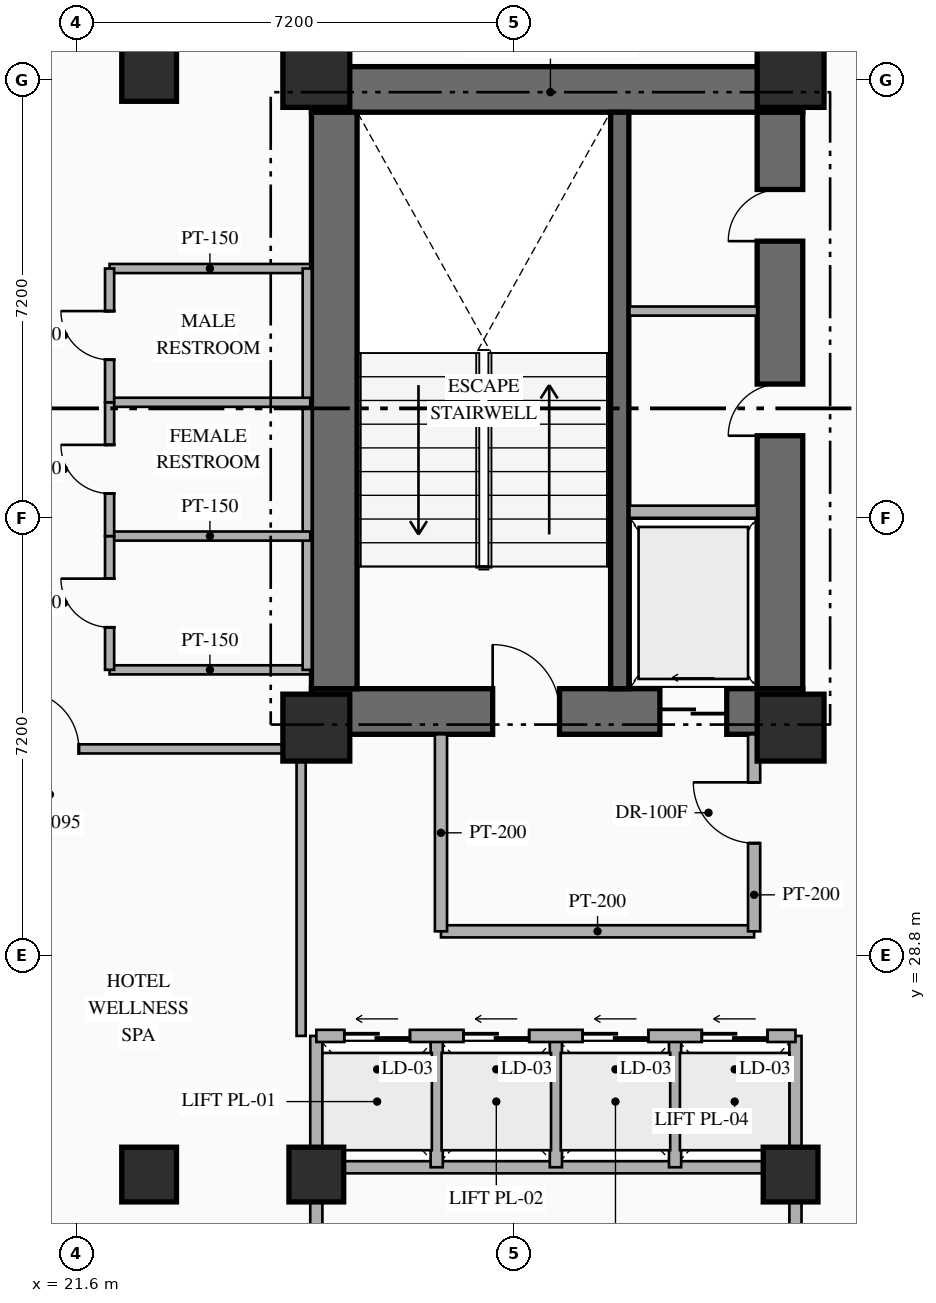
"""IFC4 building model, lengths in metres.
Left out: names, types, materials, properties, quantities, classifications, styles, units other than length and angle.
Written with IfcOpenShell. Run it as: python <this file> out.ifc"""

import sys

from ifc_helpers import new_model, si_unit, direction, frame, frame_2d, origin, origin_2d, place, context, subcontext, project, spatial, rectangle, hollow_rectangle, extrude, element, fill, save


model = new_model("IFC4")
c1 = context("Model", 3, precision=1e-05, world=origin(), true_north=direction((0.0, 1.0)))
c2 = subcontext(c1, "Body", "Model", "MODEL_VIEW")
j1 = project(units=[si_unit("LENGTHUNIT", "METRE"), si_unit("PLANEANGLEUNIT", "RADIAN")], contexts=[c1])
p1 = place(None, origin())
s1 = spatial("IfcSite", under=j1, at=p1, CompositionType="ELEMENT")
p2 = place(p1, origin())
s2 = spatial("IfcBuilding", under=s1, at=p2, CompositionType="ELEMENT")
p3 = place(p2, frame((0.0, 0.0, 77.95)))
s3 = spatial("IfcBuildingStorey", under=s2, at=p3, CompositionType="ELEMENT", Elevation=77.95)
p4 = place(p3, frame((25.47, 32.815, 0.0), z_axis=(0.0, 0.0, 1.0), x_axis=(1.0, 0.0, 0.0)))
e1 = element("IfcWall", 1, at=p4, inside=s3, PredefinedType="SHEAR", context=c2, shape_type="SweptSolid", body=[
    extrude(rectangle(XDim=8.08, YDim=0.75, at=frame_2d((4.04, 0.0))), origin(), (0.0, 0.0, 1.0), 3.35),
])
p5 = place(p4, frame((2.98, 0.0, 0.0)))
e2 = element("IfcOpeningElement", 2, at=p5, cuts=e1, PredefinedType="OPENING", context=c2, shape_type="SweptSolid", body=[
    extrude(rectangle(XDim=1.1, YDim=2.2, at=frame_2d((0.55, 1.1))), frame((0.0, 0.385, 0.0), z_axis=(0.0, -1.0, 0.0), x_axis=(1.0, 0.0, 0.0)), (0.0, 0.0, 1.0), 0.77),
])
p6 = place(p4, frame((5.73, 0.0, 0.0)))
e3 = element("IfcOpeningElement", 3, at=p6, cuts=e1, PredefinedType="OPENING", context=c2, shape_type="SweptSolid", body=[
    extrude(rectangle(XDim=1.1, YDim=2.15, at=frame_2d((0.55, 1.075))), frame((0.0, 0.385, 0.0), z_axis=(0.0, -1.0, 0.0), x_axis=(1.0, 0.0, 0.0)), (0.0, 0.0, 1.0), 0.77),
])
p7 = place(p3, frame((25.47, 43.045, 0.0), z_axis=(0.0, 0.0, 1.0), x_axis=(1.0, 0.0, 0.0)))
e4 = element("IfcWall", 4, at=p7, inside=s3, PredefinedType="SHEAR", context=c2, shape_type="SweptSolid", body=[
    extrude(rectangle(XDim=8.08, YDim=0.75, at=frame_2d((4.04, 0.0))), origin(), (0.0, 0.0, 1.0), 3.35),
])
p8 = place(p3, frame((25.845, 33.19, 0.0), z_axis=(0.0, 0.0, 1.0), x_axis=(0.0, 1.0, 0.0)))
e5 = element("IfcWall", 5, at=p8, inside=s3, PredefinedType="SHEAR", context=c2, shape_type="SweptSolid", body=[
    extrude(rectangle(XDim=9.48, YDim=0.75, at=frame_2d((4.74, 0.0))), origin(), (0.0, 0.0, 1.0), 3.35),
])
p9 = place(p3, frame((33.175, 33.19, 0.0), z_axis=(0.0, 0.0, 1.0), x_axis=(0.0, 1.0, 0.0)))
e6 = element("IfcWall", 6, at=p9, inside=s3, PredefinedType="SHEAR", context=c2, shape_type="SweptSolid", body=[
    extrude(rectangle(XDim=9.48, YDim=0.75, at=frame_2d((4.74, 0.0))), origin(), (0.0, 0.0, 1.0), 3.35),
])
p10 = place(p9, frame((4.16, 0.0, 0.0)))
e7 = element("IfcOpeningElement", 7, at=p10, cuts=e6, PredefinedType="OPENING", context=c2, shape_type="SweptSolid", body=[
    extrude(rectangle(XDim=0.85, YDim=2.08, at=frame_2d((0.425, 1.04))), frame((0.0, 0.385, 0.0), z_axis=(0.0, -1.0, 0.0), x_axis=(1.0, 0.0, 0.0)), (0.0, 0.0, 1.0), 0.77),
])
p11 = place(p9, frame((7.36, 0.0, 0.0)))
e8 = element("IfcOpeningElement", 8, at=p11, cuts=e6, PredefinedType="OPENING", context=c2, shape_type="SweptSolid", body=[
    extrude(rectangle(XDim=0.85, YDim=2.08, at=frame_2d((0.425, 1.04))), frame((0.0, 0.385, 0.0), z_axis=(0.0, -1.0, 0.0), x_axis=(1.0, 0.0, 0.0)), (0.0, 0.0, 1.0), 0.77),
])
p12 = place(p3, frame((30.54, 33.19, 0.0), z_axis=(0.0, 0.0, 1.0), x_axis=(0.0, 1.0, 0.0)))
e9 = element("IfcWall", 9, at=p12, inside=s3, PredefinedType="SHEAR", context=c2, shape_type="SweptSolid", body=[
    extrude(rectangle(XDim=9.48, YDim=0.3, at=frame_2d((4.74, 0.0))), origin(), (0.0, 0.0, 1.0), 3.35),
])
for number, where, z_axis, x_axis in (
    (10, (25.55, 32.55, 0.0), (0.0, 0.0, 1.0), (1.0, 0.0, 0.0)),
    (11, (33.35, 32.55, 0.0), (0.0, 0.0, 1.0), (1.0, 0.0, 0.0)),
    (12, (25.55, 43.3, 0.0), (0.0, 0.0, 1.0), (1.0, 0.0, 0.0)),
    (13, (33.35, 43.3, 0.0), (0.0, 0.0, 1.0), (1.0, 0.0, 0.0)),
):
    element("IfcColumn", number, at=place(p3, frame(where, z_axis=z_axis, x_axis=x_axis)), inside=s3, PredefinedType="COLUMN", context=c2, shape_type="SweptSolid", body=[
        extrude(rectangle(XDim=1.1, YDim=1.1, at=origin_2d()), origin(), (0.0, 0.0, 1.0), 3.35),
    ])
for number, where, z_axis, x_axis in (
    (14, (25.55, 25.2, 0.0), (0.0, 0.0, 1.0), (1.0, 0.0, 0.0)),
    (15, (33.35, 25.2, 0.0), (0.0, 0.0, 1.0), (1.0, 0.0, 0.0)),
    (16, (22.8, 25.2, 0.0), (0.0, 0.0, 1.0), (1.0, 0.0, 0.0)),
    (17, (22.8, 43.3, 0.0), (0.0, 0.0, 1.0), (1.0, 0.0, 0.0)),
):
    element("IfcColumn", number, at=place(p3, frame(where, z_axis=z_axis, x_axis=x_axis)), inside=s3, PredefinedType="COLUMN", context=c2, shape_type="SweptSolid", body=[
        extrude(hollow_rectangle(XDim=0.9, YDim=0.9, WallThickness=0.036, at=origin_2d()), origin(), (0.0, 0.0, 1.0), 3.35),
    ])
p13 = place(p3, frame((30.7, 36.1, 0.0), z_axis=(0.0, 0.0, 1.0), x_axis=(1.0, 0.0, 0.0)))
e18 = element("IfcWall", 18, at=p13, inside=s3, PredefinedType="STANDARD", context=c2, shape_type="SweptSolid", body=[
    extrude(rectangle(XDim=2.1, YDim=0.2, at=frame_2d((1.05, 0.0))), origin(), (0.0, 0.0, 1.0), 3.13),
])
p14 = place(p3, frame((30.7, 39.4, 0.0), z_axis=(0.0, 0.0, 1.0), x_axis=(1.0, 0.0, 0.0)))
e19 = element("IfcWall", 19, at=p14, inside=s3, PredefinedType="PARTITIONING", context=c2, shape_type="SweptSolid", body=[
    extrude(rectangle(XDim=2.1, YDim=0.15, at=frame_2d((1.05, 0.0))), origin(), (0.0, 0.0, 1.0), 3.13),
])
p15 = place(p3, frame((27.6, 29.2, 0.0), z_axis=(0.0, 0.0, 1.0), x_axis=(1.0, 0.0, 0.0)))
e20 = element("IfcWall", 20, at=p15, inside=s3, PredefinedType="STANDARD", context=c2, shape_type="SweptSolid", body=[
    extrude(rectangle(XDim=5.15, YDim=0.2, at=frame_2d((2.575, 0.0))), origin(), (0.0, 0.0, 1.0), 3.13),
])
p16 = place(p3, frame((27.6, 29.2, 0.0), z_axis=(0.0, 0.0, 1.0), x_axis=(0.0, 1.0, 0.0)))
e21 = element("IfcWall", 21, at=p16, inside=s3, PredefinedType="STANDARD", context=c2, shape_type="SweptSolid", body=[
    extrude(rectangle(XDim=3.24, YDim=0.2, at=frame_2d((1.62, 0.0))), origin(), (0.0, 0.0, 1.0), 3.13),
])
p17 = place(p3, frame((32.75, 29.2, 0.0), z_axis=(0.0, 0.0, 1.0), x_axis=(0.0, 1.0, 0.0)))
e22 = element("IfcWall", 22, at=p17, inside=s3, PredefinedType="STANDARD", context=c2, shape_type="SweptSolid", body=[
    extrude(rectangle(XDim=3.24, YDim=0.2, at=frame_2d((1.62, 0.0))), origin(), (0.0, 0.0, 1.0), 3.13),
])
p18 = place(p17, frame((1.45, 0.0, 0.0)))
e23 = element("IfcOpeningElement", 23, at=p18, cuts=e22, PredefinedType="OPENING", context=c2, shape_type="SweptSolid", body=[
    extrude(rectangle(XDim=1.0, YDim=2.2, at=frame_2d((0.5, 1.1))), frame((0.0, 0.11, 0.0), z_axis=(0.0, -1.0, 0.0), x_axis=(1.0, 0.0, 0.0)), (0.0, 0.0, 1.0), 0.22),
])
for number, where, z_axis, x_axis in (
    (24, (25.55, 23.4, 0.0), (0.0, 0.0, 1.0), (0.0, 1.0, 0.0)),
    (25, (33.43, 23.4, 0.0), (0.0, 0.0, 1.0), (0.0, 1.0, 0.0)),
):
    element("IfcWall", number, at=place(p3, frame(where, z_axis=z_axis, x_axis=x_axis)), inside=s3, PredefinedType="STANDARD", context=c2, shape_type="SweptSolid", body=[
        extrude(rectangle(XDim=4.08, YDim=0.2, at=frame_2d((2.04, 0.0))), origin(), (0.0, 0.0, 1.0), 2.425),
    ])
p19 = place(p3, frame((25.55, 25.32, 0.0), z_axis=(0.0, 0.0, 1.0), x_axis=(1.0, 0.0, 0.0)))
e26 = element("IfcWall", 26, at=p19, inside=s3, PredefinedType="STANDARD", context=c2, shape_type="SweptSolid", body=[
    extrude(rectangle(XDim=7.88, YDim=0.2, at=frame_2d((3.94, 0.0))), origin(), (0.0, 0.0, 1.0), 2.525),
])
for number, where, z_axis, x_axis in (
    (27, (27.53, 25.32, 0.0), (0.0, 0.0, 1.0), (0.0, 1.0, 0.0)),
    (28, (29.49, 25.32, 0.0), (0.0, 0.0, 1.0), (0.0, 1.0, 0.0)),
    (29, (31.45, 25.32, 0.0), (0.0, 0.0, 1.0), (0.0, 1.0, 0.0)),
):
    element("IfcWall", number, at=place(p3, frame(where, z_axis=z_axis, x_axis=x_axis)), inside=s3, PredefinedType="STANDARD", context=c2, shape_type="SweptSolid", body=[
        extrude(rectangle(XDim=2.16, YDim=0.2, at=frame_2d((1.08, 0.0))), origin(), (0.0, 0.0, 1.0), 3.13),
    ])
p20 = place(p3, frame((25.55, 27.48, 0.0), z_axis=(0.0, 0.0, 1.0), x_axis=(1.0, 0.0, 0.0)))
e30 = element("IfcWall", 30, at=p20, inside=s3, PredefinedType="STANDARD", context=c2, shape_type="SweptSolid", body=[
    extrude(rectangle(XDim=7.88, YDim=0.2, at=frame_2d((3.94, 0.0))), origin(), (0.0, 0.0, 1.0), 3.13),
])
p21 = place(p20, frame((0.46, 0.0, 0.0)))
e31 = element("IfcOpeningElement", 31, at=p21, cuts=e30, PredefinedType="OPENING", context=c2, shape_type="SweptSolid", body=[
    extrude(rectangle(XDim=1.08, YDim=2.15, at=frame_2d((0.54, 1.075))), frame((0.0, 0.11, 0.0), z_axis=(0.0, -1.0, 0.0), x_axis=(1.0, 0.0, 0.0)), (0.0, 0.0, 1.0), 0.22),
])
p22 = place(p20, frame((2.42, 0.0, 0.0)))
e32 = element("IfcOpeningElement", 32, at=p22, cuts=e30, PredefinedType="OPENING", context=c2, shape_type="SweptSolid", body=[
    extrude(rectangle(XDim=1.08, YDim=2.15, at=frame_2d((0.54, 1.075))), frame((0.0, 0.11, 0.0), z_axis=(0.0, -1.0, 0.0), x_axis=(1.0, 0.0, 0.0)), (0.0, 0.0, 1.0), 0.22),
])
p23 = place(p20, frame((4.38, 0.0, 0.0)))
e33 = element("IfcOpeningElement", 33, at=p23, cuts=e30, PredefinedType="OPENING", context=c2, shape_type="SweptSolid", body=[
    extrude(rectangle(XDim=1.08, YDim=2.15, at=frame_2d((0.54, 1.075))), frame((0.0, 0.11, 0.0), z_axis=(0.0, -1.0, 0.0), x_axis=(1.0, 0.0, 0.0)), (0.0, 0.0, 1.0), 0.22),
])
p24 = place(p20, frame((6.34, 0.0, 0.0)))
e34 = element("IfcOpeningElement", 34, at=p24, cuts=e30, PredefinedType="OPENING", context=c2, shape_type="SweptSolid", body=[
    extrude(rectangle(XDim=1.08, YDim=2.15, at=frame_2d((0.54, 1.075))), frame((0.0, 0.11, 0.0), z_axis=(0.0, -1.0, 0.0), x_axis=(1.0, 0.0, 0.0)), (0.0, 0.0, 1.0), 0.22),
])
for number, where, z_axis, x_axis in (
    (35, (22.15, 33.5, 0.0), (0.0, 0.0, 1.0), (1.0, 0.0, 0.0)),
    (36, (22.15, 40.1, 0.0), (0.0, 0.0, 1.0), (1.0, 0.0, 0.0)),
):
    element("IfcWall", number, at=place(p3, frame(where, z_axis=z_axis, x_axis=x_axis)), inside=s3, PredefinedType="PARTITIONING", context=c2, shape_type="SweptSolid", body=[
        extrude(rectangle(XDim=3.3, YDim=0.15, at=frame_2d((1.65, 0.0))), origin(), (0.0, 0.0, 1.0), 3.13),
    ])
p25 = place(p3, frame((25.4, 33.5, 0.0), z_axis=(0.0, 0.0, 1.0), x_axis=(0.0, 1.0, 0.0)))
e37 = element("IfcWall", 37, at=p25, inside=s3, PredefinedType="PARTITIONING", context=c2, shape_type="SweptSolid", body=[
    extrude(rectangle(XDim=6.6, YDim=0.15, at=frame_2d((3.3, 0.0))), origin(), (0.0, 0.0, 1.0), 3.13),
])
for number, where, z_axis, x_axis in (
    (38, (22.15, 35.7, 0.0), (0.0, 0.0, 1.0), (1.0, 0.0, 0.0)),
    (39, (22.15, 37.9, 0.0), (0.0, 0.0, 1.0), (1.0, 0.0, 0.0)),
):
    element("IfcWall", number, at=place(p3, frame(where, z_axis=z_axis, x_axis=x_axis)), inside=s3, PredefinedType="PARTITIONING", context=c2, shape_type="SweptSolid", body=[
        extrude(rectangle(XDim=3.3, YDim=0.15, at=frame_2d((1.65, 0.0))), origin(), (0.0, 0.0, 1.0), 3.13),
    ])
p26 = place(p3, frame((22.15, 33.5, 0.0), z_axis=(0.0, 0.0, 1.0), x_axis=(0.0, 1.0, 0.0)))
e40 = element("IfcWall", 40, at=p26, inside=s3, PredefinedType="PARTITIONING", context=c2, shape_type="SweptSolid", body=[
    extrude(rectangle(XDim=2.2, YDim=0.15, at=frame_2d((1.1, 0.0))), origin(), (0.0, 0.0, 1.0), 3.13),
])
p27 = place(p26, frame((0.7, 0.0, 0.0)))
e41 = element("IfcOpeningElement", 41, at=p27, cuts=e40, PredefinedType="OPENING", context=c2, shape_type="SweptSolid", body=[
    extrude(rectangle(XDim=0.8, YDim=2.06, at=frame_2d((0.4, 1.03))), frame((0.0, 0.085, 0.0), z_axis=(0.0, -1.0, 0.0), x_axis=(1.0, 0.0, 0.0)), (0.0, 0.0, 1.0), 0.17),
])
p28 = place(p3, frame((22.15, 35.7, 0.0), z_axis=(0.0, 0.0, 1.0), x_axis=(0.0, 1.0, 0.0)))
e42 = element("IfcWall", 42, at=p28, inside=s3, PredefinedType="PARTITIONING", context=c2, shape_type="SweptSolid", body=[
    extrude(rectangle(XDim=2.2, YDim=0.15, at=frame_2d((1.1, 0.0))), origin(), (0.0, 0.0, 1.0), 3.13),
])
p29 = place(p28, frame((0.7, 0.0, 0.0)))
e43 = element("IfcOpeningElement", 43, at=p29, cuts=e42, PredefinedType="OPENING", context=c2, shape_type="SweptSolid", body=[
    extrude(rectangle(XDim=0.8, YDim=2.06, at=frame_2d((0.4, 1.03))), frame((0.0, 0.085, 0.0), z_axis=(0.0, -1.0, 0.0), x_axis=(1.0, 0.0, 0.0)), (0.0, 0.0, 1.0), 0.17),
])
p30 = place(p3, frame((22.15, 37.9, 0.0), z_axis=(0.0, 0.0, 1.0), x_axis=(0.0, 1.0, 0.0)))
e44 = element("IfcWall", 44, at=p30, inside=s3, PredefinedType="PARTITIONING", context=c2, shape_type="SweptSolid", body=[
    extrude(rectangle(XDim=2.2, YDim=0.15, at=frame_2d((1.1, 0.0))), origin(), (0.0, 0.0, 1.0), 3.13),
])
p31 = place(p30, frame((0.7, 0.0, 0.0)))
e45 = element("IfcOpeningElement", 45, at=p31, cuts=e44, PredefinedType="OPENING", context=c2, shape_type="SweptSolid", body=[
    extrude(rectangle(XDim=0.8, YDim=2.06, at=frame_2d((0.4, 1.03))), frame((0.0, 0.085, 0.0), z_axis=(0.0, -1.0, 0.0), x_axis=(1.0, 0.0, 0.0)), (0.0, 0.0, 1.0), 0.17),
])
p32 = place(p3, frame((33.384, 17.312, 0.0), z_axis=(0.0, 0.0, 1.0), x_axis=(0.600008743659, 0.799993442181, 0.0)))
e46 = element("IfcWall", 46, at=p32, inside=s3, PredefinedType="PARTITIONING", context=c2, shape_type="SweptSolid", body=[
    extrude(rectangle(XDim=8.935, YDim=0.15, at=frame_2d((4.468, 0.0))), origin(), (0.0, 0.0, 1.0), 3.13),
])
p33 = place(p3, frame((19.95, 32.2, 0.0), z_axis=(0.0, 0.0, 1.0), x_axis=(1.0, 0.0, 0.0)))
e47 = element("IfcWall", 47, at=p33, inside=s3, PredefinedType="PARTITIONING", context=c2, shape_type="SweptSolid", body=[
    extrude(rectangle(XDim=5.35, YDim=0.15, at=frame_2d((2.675, 0.0))), origin(), (0.0, 0.0, 1.0), 3.13),
])
p34 = place(p33, frame((0.744, 0.0, 0.0)))
e48 = element("IfcOpeningElement", 48, at=p34, cuts=e47, PredefinedType="OPENING", context=c2, shape_type="SweptSolid", body=[
    extrude(rectangle(XDim=0.95, YDim=2.15, at=frame_2d((0.475, 1.075))), frame((0.0, 0.085, 0.0), z_axis=(0.0, -1.0, 0.0), x_axis=(1.0, 0.0, 0.0)), (0.0, 0.0, 1.0), 0.17),
])
p35 = place(p3, frame((25.3, 27.48, 0.0), z_axis=(0.0, 0.0, 1.0), x_axis=(0.0, 1.0, 0.0)))
e49 = element("IfcWall", 49, at=p35, inside=s3, PredefinedType="PARTITIONING", context=c2, shape_type="SweptSolid", body=[
    extrude(rectangle(XDim=4.72, YDim=0.15, at=frame_2d((2.36, 0.0))), origin(), (0.0, 0.0, 1.0), 2.425),
])
p36 = place(p5, origin())
e50 = element("IfcDoor", 50, at=p36, inside=s3, OperationType="SINGLE_SWING_LEFT", PredefinedType="DOOR", context=c2, shape_type="SweptSolid", body=[
    extrude(rectangle(XDim=1.1, YDim=2.2, at=frame_2d((0.55, 1.1))), frame((0.0, 0.025, 0.0), z_axis=(0.0, -1.0, 0.0), x_axis=(1.0, 0.0, 0.0)), (0.0, 0.0, 1.0), 0.05),
])
fill(e2, e50)
p37 = place(p6, origin())
e51 = element("IfcDoor", 51, at=p37, inside=s3, OperationType="SLIDING_TO_LEFT", PredefinedType="USERDEFINED", context=c2, shape_type="SweptSolid", body=[
    extrude(rectangle(XDim=1.1, YDim=2.15, at=frame_2d((0.55, 1.075))), frame((0.0, 0.025, 0.0), z_axis=(0.0, -1.0, 0.0), x_axis=(1.0, 0.0, 0.0)), (0.0, 0.0, 1.0), 0.05),
])
fill(e3, e51)
p38 = place(p10, origin())
e52 = element("IfcDoor", 52, at=p38, inside=s3, OperationType="SINGLE_SWING_LEFT", PredefinedType="DOOR", context=c2, shape_type="SweptSolid", body=[
    extrude(rectangle(XDim=0.85, YDim=2.08, at=frame_2d((0.425, 1.04))), frame((0.0, 0.025, 0.0), z_axis=(0.0, -1.0, 0.0), x_axis=(1.0, 0.0, 0.0)), (0.0, 0.0, 1.0), 0.05),
])
fill(e7, e52)
p39 = place(p11, origin())
e53 = element("IfcDoor", 53, at=p39, inside=s3, OperationType="SINGLE_SWING_LEFT", PredefinedType="DOOR", context=c2, shape_type="SweptSolid", body=[
    extrude(rectangle(XDim=0.85, YDim=2.08, at=frame_2d((0.425, 1.04))), frame((0.0, 0.025, 0.0), z_axis=(0.0, -1.0, 0.0), x_axis=(1.0, 0.0, 0.0)), (0.0, 0.0, 1.0), 0.05),
])
fill(e8, e53)
p40 = place(p18, origin())
e54 = element("IfcDoor", 54, at=p40, inside=s3, OperationType="SINGLE_SWING_RIGHT", PredefinedType="DOOR", context=c2, shape_type="SweptSolid", body=[
    extrude(rectangle(XDim=1.0, YDim=2.2, at=frame_2d((0.5, 1.1))), frame((0.0, 0.025, 0.0), z_axis=(0.0, -1.0, 0.0), x_axis=(1.0, 0.0, 0.0)), (0.0, 0.0, 1.0), 0.05),
])
fill(e23, e54)
p41 = place(p21, origin())
e55 = element("IfcDoor", 55, at=p41, inside=s3, OperationType="SLIDING_TO_LEFT", PredefinedType="USERDEFINED", context=c2, shape_type="SweptSolid", body=[
    extrude(rectangle(XDim=1.08, YDim=2.15, at=frame_2d((0.54, 1.075))), frame((0.0, 0.025, 0.0), z_axis=(0.0, -1.0, 0.0), x_axis=(1.0, 0.0, 0.0)), (0.0, 0.0, 1.0), 0.05),
])
fill(e31, e55)
p42 = place(p22, origin())
e56 = element("IfcDoor", 56, at=p42, inside=s3, OperationType="SLIDING_TO_LEFT", PredefinedType="USERDEFINED", context=c2, shape_type="SweptSolid", body=[
    extrude(rectangle(XDim=1.08, YDim=2.15, at=frame_2d((0.54, 1.075))), frame((0.0, 0.025, 0.0), z_axis=(0.0, -1.0, 0.0), x_axis=(1.0, 0.0, 0.0)), (0.0, 0.0, 1.0), 0.05),
])
fill(e32, e56)
p43 = place(p23, origin())
e57 = element("IfcDoor", 57, at=p43, inside=s3, OperationType="SLIDING_TO_LEFT", PredefinedType="USERDEFINED", context=c2, shape_type="SweptSolid", body=[
    extrude(rectangle(XDim=1.08, YDim=2.15, at=frame_2d((0.54, 1.075))), frame((0.0, 0.025, 0.0), z_axis=(0.0, -1.0, 0.0), x_axis=(1.0, 0.0, 0.0)), (0.0, 0.0, 1.0), 0.05),
])
fill(e33, e57)
p44 = place(p24, origin())
e58 = element("IfcDoor", 58, at=p44, inside=s3, OperationType="SLIDING_TO_LEFT", PredefinedType="USERDEFINED", context=c2, shape_type="SweptSolid", body=[
    extrude(rectangle(XDim=1.08, YDim=2.15, at=frame_2d((0.54, 1.075))), frame((0.0, 0.025, 0.0), z_axis=(0.0, -1.0, 0.0), x_axis=(1.0, 0.0, 0.0)), (0.0, 0.0, 1.0), 0.05),
])
fill(e34, e58)
p45 = place(p27, origin())
e59 = element("IfcDoor", 59, at=p45, inside=s3, OperationType="SINGLE_SWING_RIGHT", PredefinedType="DOOR", context=c2, shape_type="SweptSolid", body=[
    extrude(rectangle(XDim=0.8, YDim=2.06, at=frame_2d((0.4, 1.03))), frame((0.0, 0.025, 0.0), z_axis=(0.0, -1.0, 0.0), x_axis=(1.0, 0.0, 0.0)), (0.0, 0.0, 1.0), 0.05),
])
fill(e41, e59)
p46 = place(p29, origin())
e60 = element("IfcDoor", 60, at=p46, inside=s3, OperationType="SINGLE_SWING_RIGHT", PredefinedType="DOOR", context=c2, shape_type="SweptSolid", body=[
    extrude(rectangle(XDim=0.8, YDim=2.06, at=frame_2d((0.4, 1.03))), frame((0.0, 0.025, 0.0), z_axis=(0.0, -1.0, 0.0), x_axis=(1.0, 0.0, 0.0)), (0.0, 0.0, 1.0), 0.05),
])
fill(e43, e60)
p47 = place(p31, origin())
e61 = element("IfcDoor", 61, at=p47, inside=s3, OperationType="SINGLE_SWING_RIGHT", PredefinedType="DOOR", context=c2, shape_type="SweptSolid", body=[
    extrude(rectangle(XDim=0.8, YDim=2.06, at=frame_2d((0.4, 1.03))), frame((0.0, 0.025, 0.0), z_axis=(0.0, -1.0, 0.0), x_axis=(1.0, 0.0, 0.0)), (0.0, 0.0, 1.0), 0.05),
])
fill(e45, e61)
p48 = place(p34, origin())
e62 = element("IfcDoor", 62, at=p48, inside=s3, OperationType="SINGLE_SWING_LEFT", PredefinedType="DOOR", context=c2, shape_type="SweptSolid", body=[
    extrude(rectangle(XDim=0.95, YDim=2.15, at=frame_2d((0.475, 1.075))), frame((0.0, 0.025, 0.0), z_axis=(0.0, -1.0, 0.0), x_axis=(1.0, 0.0, 0.0)), (0.0, 0.0, 1.0), 0.05),
])
fill(e48, e62)
save(model, sys.argv[1])
